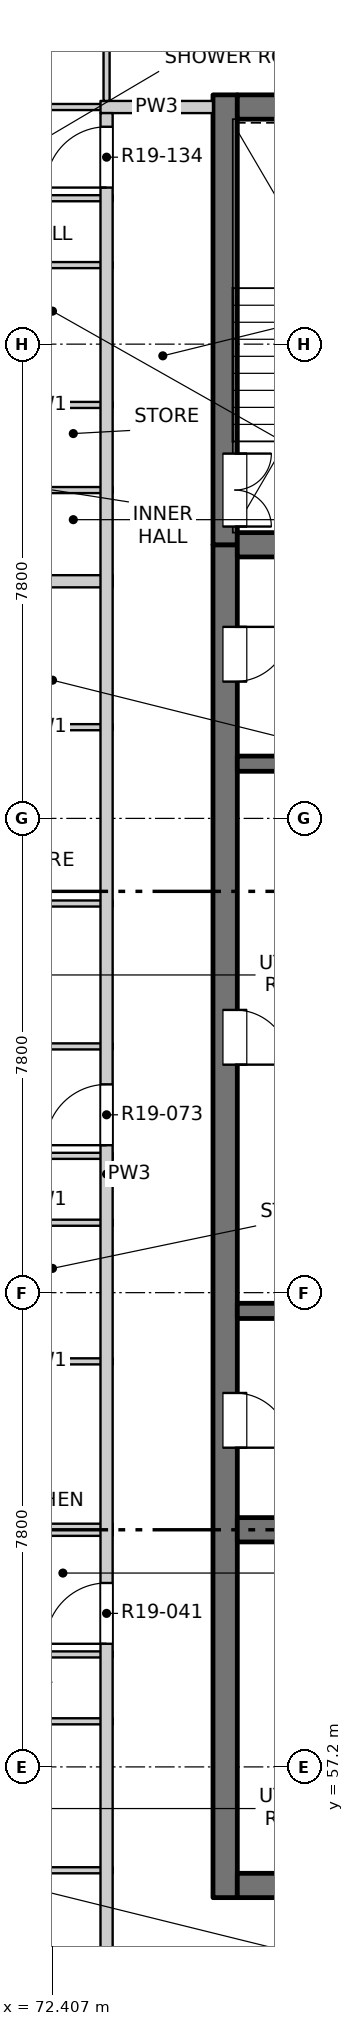
"""IFC4 building model, lengths in metres.
Left out: names, types, materials, properties, quantities, classifications, styles, units other than length and angle.
Written with IfcOpenShell. Run it as: python <this file> out.ifc"""

import sys

from ifc_helpers import new_model, si_unit, direction, frame, frame_2d, origin, place, context, subcontext, project, spatial, rectangle, extrude, element, fill, save


model = new_model("IFC4")
c1 = context("Model", 3, precision=1e-05, world=origin(), true_north=direction((0.0, 1.0)))
c2 = subcontext(c1, "Body", "Model", "MODEL_VIEW")
j1 = project(units=[si_unit("LENGTHUNIT", "METRE"), si_unit("PLANEANGLEUNIT", "RADIAN")], contexts=[c1])
p1 = place(None, origin())
s1 = spatial("IfcSite", under=j1, at=p1, CompositionType="ELEMENT")
p2 = place(p1, origin())
s2 = spatial("IfcBuilding", under=s1, at=p2, CompositionType="ELEMENT")
p3 = place(p2, frame((0.0, 0.0, 197.3)))
s3 = spatial("IfcBuildingStorey", under=s2, at=p3, CompositionType="ELEMENT", Elevation=197.3)
p4 = place(p3, frame((75.25, 55.05, -0.3), z_axis=(0.0, 0.0, 1.0), x_axis=(0.0, 1.0, 0.0)))
e1 = element("IfcWall", 1, at=p4, inside=s3, PredefinedType="SOLIDWALL", context=c2, shape_type="SweptSolid", body=[
    extrude(rectangle(XDim=22.25, YDim=0.4, at=frame_2d((11.125, 0.0))), origin(), (0.0, 0.0, 1.0), 3.45),
])
p5 = place(p4, frame((7.4, 0.0, 0.3)))
e2 = element("IfcOpeningElement", 2, at=p5, cuts=e1, PredefinedType="OPENING", context=c2, shape_type="SweptSolid", body=[
    extrude(rectangle(XDim=0.9, YDim=2.1, at=frame_2d((0.45, 1.05))), frame((0.0, 0.21, 0.0), z_axis=(0.0, -1.0, 0.0), x_axis=(1.0, 0.0, 0.0)), (0.0, 0.0, 1.0), 0.42),
])
p6 = place(p4, frame((13.7, 0.0, 0.3)))
e3 = element("IfcOpeningElement", 3, at=p6, cuts=e1, PredefinedType="OPENING", context=c2, shape_type="SweptSolid", body=[
    extrude(rectangle(XDim=0.9, YDim=2.1, at=frame_2d((0.45, 1.05))), frame((0.0, 0.21, 0.0), z_axis=(0.0, -1.0, 0.0), x_axis=(1.0, 0.0, 0.0)), (0.0, 0.0, 1.0), 0.42),
])
p7 = place(p4, frame((20.0, 0.0, 0.3)))
e4 = element("IfcOpeningElement", 4, at=p7, cuts=e1, PredefinedType="OPENING", context=c2, shape_type="SweptSolid", body=[
    extrude(rectangle(XDim=0.9, YDim=2.1, at=frame_2d((0.45, 1.05))), frame((0.0, 0.21, 0.0), z_axis=(0.0, -1.0, 0.0), x_axis=(1.0, 0.0, 0.0)), (0.0, 0.0, 1.0), 0.42),
])
p8 = place(p3, frame((75.25, 77.3, -0.3), z_axis=(0.0, 0.0, 1.0), x_axis=(0.0, 1.0, 0.0)))
e5 = element("IfcWall", 5, at=p8, inside=s3, PredefinedType="SOLIDWALL", context=c2, shape_type="SweptSolid", body=[
    extrude(rectangle(XDim=7.4, YDim=0.4, at=frame_2d((3.7, 0.0))), origin(), (0.0, 0.0, 1.0), 3.45),
])
p9 = place(p8, frame((0.3, 0.0, 0.3)))
e6 = element("IfcOpeningElement", 6, at=p9, cuts=e5, PredefinedType="OPENING", context=c2, shape_type="SweptSolid", body=[
    extrude(rectangle(XDim=1.2, YDim=2.1, at=frame_2d((0.6, 1.05))), frame((0.0, 0.21, 0.0), z_axis=(0.0, -1.0, 0.0), x_axis=(1.0, 0.0, 0.0)), (0.0, 0.0, 1.0), 0.42),
])
p10 = place(p3, frame((75.45, 55.25, -0.3), z_axis=(0.0, 0.0, 1.0), x_axis=(1.0, 0.0, 0.0)))
e7 = element("IfcWall", 7, at=p10, inside=s3, PredefinedType="SOLIDWALL", context=c2, shape_type="SweptSolid", body=[
    extrude(rectangle(XDim=19.1, YDim=0.4, at=frame_2d((9.55, 0.0))), origin(), (0.0, 0.0, 1.0), 3.45),
])
p11 = place(p10, frame((8.8, 0.0, 0.3)))
e8 = element("IfcOpeningElement", 8, at=p11, cuts=e7, PredefinedType="OPENING", context=c2, shape_type="SweptSolid", body=[
    extrude(rectangle(XDim=1.5, YDim=2.1, at=frame_2d((0.75, 1.05))), frame((0.0, 0.21, 0.0), z_axis=(0.0, -1.0, 0.0), x_axis=(1.0, 0.0, 0.0)), (0.0, 0.0, 1.0), 0.42),
])
p12 = place(p3, frame((75.45, 84.5, -0.3), z_axis=(0.0, 0.0, 1.0), x_axis=(1.0, 0.0, 0.0)))
e9 = element("IfcWall", 9, at=p12, inside=s3, PredefinedType="SOLIDWALL", context=c2, shape_type="SweptSolid", body=[
    extrude(rectangle(XDim=19.1, YDim=0.4, at=frame_2d((9.55, 0.0))), origin(), (0.0, 0.0, 1.0), 3.45),
])
p13 = place(p3, frame((75.45, 61.1, -0.3), z_axis=(0.0, 0.0, 1.0), x_axis=(1.0, 0.0, 0.0)))
e10 = element("IfcWall", 10, at=p13, inside=s3, PredefinedType="SOLIDWALL", context=c2, shape_type="SweptSolid", body=[
    extrude(rectangle(XDim=3.875, YDim=0.4, at=frame_2d((1.938, 0.0))), origin(), (0.0, 0.0, 1.0), 3.45),
])
for number, where, z_axis, x_axis in (
    (11, (75.45, 64.7, -0.3), (0.0, 0.0, 1.0), (1.0, 0.0, 0.0)),
    (12, (75.45, 73.7, -0.3), (0.0, 0.0, 1.0), (1.0, 0.0, 0.0)),
):
    element("IfcWall", number, at=place(p3, frame(where, z_axis=z_axis, x_axis=x_axis)), inside=s3, PredefinedType="SOLIDWALL", context=c2, shape_type="SweptSolid", body=[
        extrude(rectangle(XDim=3.875, YDim=0.25, at=frame_2d((1.938, 0.0))), origin(), (0.0, 0.0, 1.0), 3.45),
    ])
p14 = place(p3, frame((75.45, 77.3, -0.3), z_axis=(0.0, 0.0, 1.0), x_axis=(1.0, 0.0, 0.0)))
e13 = element("IfcWall", 13, at=p14, inside=s3, PredefinedType="SOLIDWALL", context=c2, shape_type="SweptSolid", body=[
    extrude(rectangle(XDim=3.875, YDim=0.4, at=frame_2d((1.938, 0.0))), origin(), (0.0, 0.0, 1.0), 3.45),
])
for number, where, z_axis, x_axis in (
    (14, (71.18, 55.5, 0.0), (0.0, 0.0, 1.0), (1.0, 0.0, 0.0)),
    (15, (71.18, 57.95, 0.0), (0.0, 0.0, 1.0), (1.0, 0.0, 0.0)),
    (16, (71.18, 59.05, 0.0), (0.0, 0.0, 1.0), (1.0, 0.0, 0.0)),
):
    element("IfcWall", number, at=place(p3, frame(where, z_axis=z_axis, x_axis=x_axis)), inside=s3, PredefinedType="PARTITIONING", context=c2, shape_type="SweptSolid", body=[
        extrude(rectangle(XDim=2.22, YDim=0.1, at=frame_2d((1.11, 0.0))), origin(), (0.0, 0.0, 1.0), 3.15),
    ])
p15 = place(p3, frame((61.9, 61.1, 0.0), z_axis=(0.0, 0.0, 1.0), x_axis=(1.0, 0.0, 0.0)))
e17 = element("IfcWall", 17, at=p15, inside=s3, PredefinedType="PARTITIONING", context=c2, shape_type="SweptSolid", body=[
    extrude(rectangle(XDim=11.5, YDim=0.2, at=frame_2d((5.75, 0.0))), origin(), (0.0, 0.0, 1.0), 2.55),
])
for number, where, z_axis, x_axis in (
    (18, (71.18, 63.87, 0.0), (0.0, 0.0, 1.0), (1.0, 0.0, 0.0)),
    (19, (71.18, 66.15, 0.0), (0.0, 0.0, 1.0), (1.0, 0.0, 0.0)),
    (20, (71.18, 67.25, 0.0), (0.0, 0.0, 1.0), (1.0, 0.0, 0.0)),
):
    element("IfcWall", number, at=place(p3, frame(where, z_axis=z_axis, x_axis=x_axis)), inside=s3, PredefinedType="PARTITIONING", context=c2, shape_type="SweptSolid", body=[
        extrude(rectangle(XDim=2.22, YDim=0.1, at=frame_2d((1.11, 0.0))), origin(), (0.0, 0.0, 1.0), 3.15),
    ])
p16 = place(p3, frame((71.18, 69.05, 0.0), z_axis=(0.0, 0.0, 1.0), x_axis=(1.0, 0.0, 0.0)))
e21 = element("IfcWall", 21, at=p16, inside=s3, PredefinedType="PARTITIONING", context=c2, shape_type="SweptSolid", body=[
    extrude(rectangle(XDim=2.22, YDim=0.1, at=frame_2d((1.11, 0.0))), origin(), (0.0, 0.0, 1.0), 2.55),
])
for number, where, z_axis, x_axis in (
    (22, (71.18, 71.4, 0.0), (0.0, 0.0, 1.0), (1.0, 0.0, 0.0)),
    (23, (71.18, 74.3, 0.0), (0.0, 0.0, 1.0), (1.0, 0.0, 0.0)),
):
    element("IfcWall", number, at=place(p3, frame(where, z_axis=z_axis, x_axis=x_axis)), inside=s3, PredefinedType="PARTITIONING", context=c2, shape_type="SweptSolid", body=[
        extrude(rectangle(XDim=2.22, YDim=0.1, at=frame_2d((1.11, 0.0))), origin(), (0.0, 0.0, 1.0), 3.15),
    ])
p17 = place(p3, frame((61.9, 76.7, 0.0), z_axis=(0.0, 0.0, 1.0), x_axis=(1.0, 0.0, 0.0)))
e24 = element("IfcWall", 24, at=p17, inside=s3, PredefinedType="PARTITIONING", context=c2, shape_type="SweptSolid", body=[
    extrude(rectangle(XDim=11.5, YDim=0.2, at=frame_2d((5.75, 0.0))), origin(), (0.0, 0.0, 1.0), 2.55),
])
for number, where, z_axis, x_axis in (
    (25, (71.18, 78.2, 0.0), (0.0, 0.0, 1.0), (1.0, 0.0, 0.0)),
    (26, (71.18, 79.6, 0.0), (0.0, 0.0, 1.0), (1.0, 0.0, 0.0)),
    (27, (71.18, 81.9, 0.0), (0.0, 0.0, 1.0), (1.0, 0.0, 0.0)),
    (28, (71.18, 83.0, 0.0), (0.0, 0.0, 1.0), (1.0, 0.0, 0.0)),
):
    element("IfcWall", number, at=place(p3, frame(where, z_axis=z_axis, x_axis=x_axis)), inside=s3, PredefinedType="PARTITIONING", context=c2, shape_type="SweptSolid", body=[
        extrude(rectangle(XDim=2.22, YDim=0.1, at=frame_2d((1.11, 0.0))), origin(), (0.0, 0.0, 1.0), 3.15),
    ])
p18 = place(p3, frame((61.9, 84.5, 0.0), z_axis=(0.0, 0.0, 1.0), x_axis=(1.0, 0.0, 0.0)))
e29 = element("IfcWall", 29, at=p18, inside=s3, PredefinedType="PARTITIONING", context=c2, shape_type="SweptSolid", body=[
    extrude(rectangle(XDim=11.5, YDim=0.1, at=frame_2d((5.75, 0.0))), origin(), (0.0, 0.0, 1.0), 3.15),
])
p19 = place(p18, frame((7.965, 0.0, 0.0)))
e30 = element("IfcOpeningElement", 30, at=p19, cuts=e29, PredefinedType="OPENING", context=c2, shape_type="SweptSolid", body=[
    extrude(rectangle(XDim=0.9, YDim=2.1, at=frame_2d((0.45, 1.05))), frame((0.0, 0.06, 0.0), z_axis=(0.0, -1.0, 0.0), x_axis=(1.0, 0.0, 0.0)), (0.0, 0.0, 1.0), 0.12),
])
p20 = place(p3, frame((73.2, 84.5, 0.0), z_axis=(0.0, 0.0, 1.0), x_axis=(1.0, 0.0, 0.0)))
e31 = element("IfcWall", 31, at=p20, inside=s3, PredefinedType="PARTITIONING", context=c2, shape_type="SweptSolid", body=[
    extrude(rectangle(XDim=1.85, YDim=0.2, at=frame_2d((0.925, 0.0))), origin(), (0.0, 0.0, 1.0), 3.15),
])
p21 = place(p3, frame((73.3, 49.5, 0.0), z_axis=(0.0, 0.0, 1.0), x_axis=(0.0, 1.0, 0.0)))
e32 = element("IfcWall", 32, at=p21, inside=s3, PredefinedType="PARTITIONING", context=c2, shape_type="SweptSolid", body=[
    extrude(rectangle(XDim=34.9, YDim=0.2, at=frame_2d((17.45, 0.0))), origin(), (0.0, 0.0, 1.0), 3.15),
])
p22 = place(p21, frame((9.725, 0.0, 0.0)))
e33 = element("IfcOpeningElement", 33, at=p22, cuts=e32, PredefinedType="OPENING", context=c2, shape_type="SweptSolid", body=[
    extrude(rectangle(XDim=1.0, YDim=2.1, at=frame_2d((0.5, 1.05))), frame((0.0, 0.11, 0.0), z_axis=(0.0, -1.0, 0.0), x_axis=(1.0, 0.0, 0.0)), (0.0, 0.0, 1.0), 0.22),
])
p23 = place(p21, frame((17.925, 0.0, 0.0)))
e34 = element("IfcOpeningElement", 34, at=p23, cuts=e32, PredefinedType="OPENING", context=c2, shape_type="SweptSolid", body=[
    extrude(rectangle(XDim=1.0, YDim=2.1, at=frame_2d((0.5, 1.05))), frame((0.0, 0.11, 0.0), z_axis=(0.0, -1.0, 0.0), x_axis=(1.0, 0.0, 0.0)), (0.0, 0.0, 1.0), 0.22),
])
p24 = place(p21, frame((33.675, 0.0, 0.0)))
e35 = element("IfcOpeningElement", 35, at=p24, cuts=e32, PredefinedType="OPENING", context=c2, shape_type="SweptSolid", body=[
    extrude(rectangle(XDim=1.0, YDim=2.1, at=frame_2d((0.5, 1.05))), frame((0.0, 0.11, 0.0), z_axis=(0.0, -1.0, 0.0), x_axis=(1.0, 0.0, 0.0)), (0.0, 0.0, 1.0), 0.22),
])
p25 = place(p3, frame((73.3, 84.6, 0.0), z_axis=(0.0, 0.0, 1.0), x_axis=(0.0, 1.0, 0.0)))
e36 = element("IfcWall", 36, at=p25, inside=s3, PredefinedType="PARTITIONING", context=c2, shape_type="SweptSolid", body=[
    extrude(rectangle(XDim=3.5, YDim=0.1, at=frame_2d((1.75, 0.0))), origin(), (0.0, 0.0, 1.0), 3.15),
])
p26 = place(p25, frame((1.4, 0.0, 0.0)))
e37 = element("IfcOpeningElement", 37, at=p26, cuts=e36, PredefinedType="OPENING", context=c2, shape_type="SweptSolid", body=[
    extrude(rectangle(XDim=0.9, YDim=2.1, at=frame_2d((0.45, 1.05))), frame((0.0, 0.06, 0.0), z_axis=(0.0, -1.0, 0.0), x_axis=(1.0, 0.0, 0.0)), (0.0, 0.0, 1.0), 0.12),
])
p27 = place(p22, origin())
e38 = element("IfcDoor", 38, at=p27, inside=s3, OperationType="SINGLE_SWING_RIGHT", PredefinedType="DOOR", context=c2, shape_type="SweptSolid", body=[
    extrude(rectangle(XDim=1.0, YDim=2.1, at=frame_2d((0.5, 1.05))), frame((0.0, 0.025, 0.0), z_axis=(0.0, -1.0, 0.0), x_axis=(1.0, 0.0, 0.0)), (0.0, 0.0, 1.0), 0.05),
])
fill(e33, e38)
p28 = place(p5, origin())
e39 = element("IfcDoor", 39, at=p28, inside=s3, OperationType="SINGLE_SWING_RIGHT", PredefinedType="DOOR", context=c2, shape_type="SweptSolid", body=[
    extrude(rectangle(XDim=0.9, YDim=2.1, at=frame_2d((0.45, 1.05))), frame((0.0, -0.135, 0.0), z_axis=(0.0, -1.0, 0.0), x_axis=(1.0, 0.0, 0.0)), (0.0, 0.0, 1.0), 0.05),
])
fill(e2, e39)
p29 = place(p23, origin())
e40 = element("IfcDoor", 40, at=p29, inside=s3, OperationType="SINGLE_SWING_RIGHT", PredefinedType="DOOR", context=c2, shape_type="SweptSolid", body=[
    extrude(rectangle(XDim=1.0, YDim=2.1, at=frame_2d((0.5, 1.05))), frame((0.0, 0.025, 0.0), z_axis=(0.0, -1.0, 0.0), x_axis=(1.0, 0.0, 0.0)), (0.0, 0.0, 1.0), 0.05),
])
fill(e34, e40)
p30 = place(p6, origin())
e41 = element("IfcDoor", 41, at=p30, inside=s3, OperationType="SINGLE_SWING_RIGHT", PredefinedType="DOOR", context=c2, shape_type="SweptSolid", body=[
    extrude(rectangle(XDim=0.9, YDim=2.1, at=frame_2d((0.45, 1.05))), frame((0.0, -0.135, 0.0), z_axis=(0.0, -1.0, 0.0), x_axis=(1.0, 0.0, 0.0)), (0.0, 0.0, 1.0), 0.05),
])
fill(e3, e41)
p31 = place(p7, origin())
e42 = element("IfcDoor", 42, at=p31, inside=s3, OperationType="SINGLE_SWING_LEFT", PredefinedType="DOOR", context=c2, shape_type="SweptSolid", body=[
    extrude(rectangle(XDim=0.9, YDim=2.1, at=frame_2d((0.45, 1.05))), frame((0.0, -0.135, 0.0), z_axis=(0.0, -1.0, 0.0), x_axis=(1.0, 0.0, 0.0)), (0.0, 0.0, 1.0), 0.05),
])
fill(e4, e42)
p32 = place(p9, origin())
e43 = element("IfcDoor", 43, at=p32, inside=s3, OperationType="DOUBLE_DOOR_SINGLE_SWING", PredefinedType="DOOR", context=c2, shape_type="SweptSolid", body=[
    extrude(rectangle(XDim=1.2, YDim=2.1, at=frame_2d((0.6, 1.05))), frame((0.0, -0.135, 0.0), z_axis=(0.0, -1.0, 0.0), x_axis=(1.0, 0.0, 0.0)), (0.0, 0.0, 1.0), 0.05),
])
fill(e6, e43)
p33 = place(p24, origin())
e44 = element("IfcDoor", 44, at=p33, inside=s3, OperationType="SINGLE_SWING_RIGHT", PredefinedType="DOOR", context=c2, shape_type="SweptSolid", body=[
    extrude(rectangle(XDim=1.0, YDim=2.1, at=frame_2d((0.5, 1.05))), frame((0.0, 0.025, 0.0), z_axis=(0.0, -1.0, 0.0), x_axis=(1.0, 0.0, 0.0)), (0.0, 0.0, 1.0), 0.05),
])
fill(e35, e44)
save(model, sys.argv[1])
